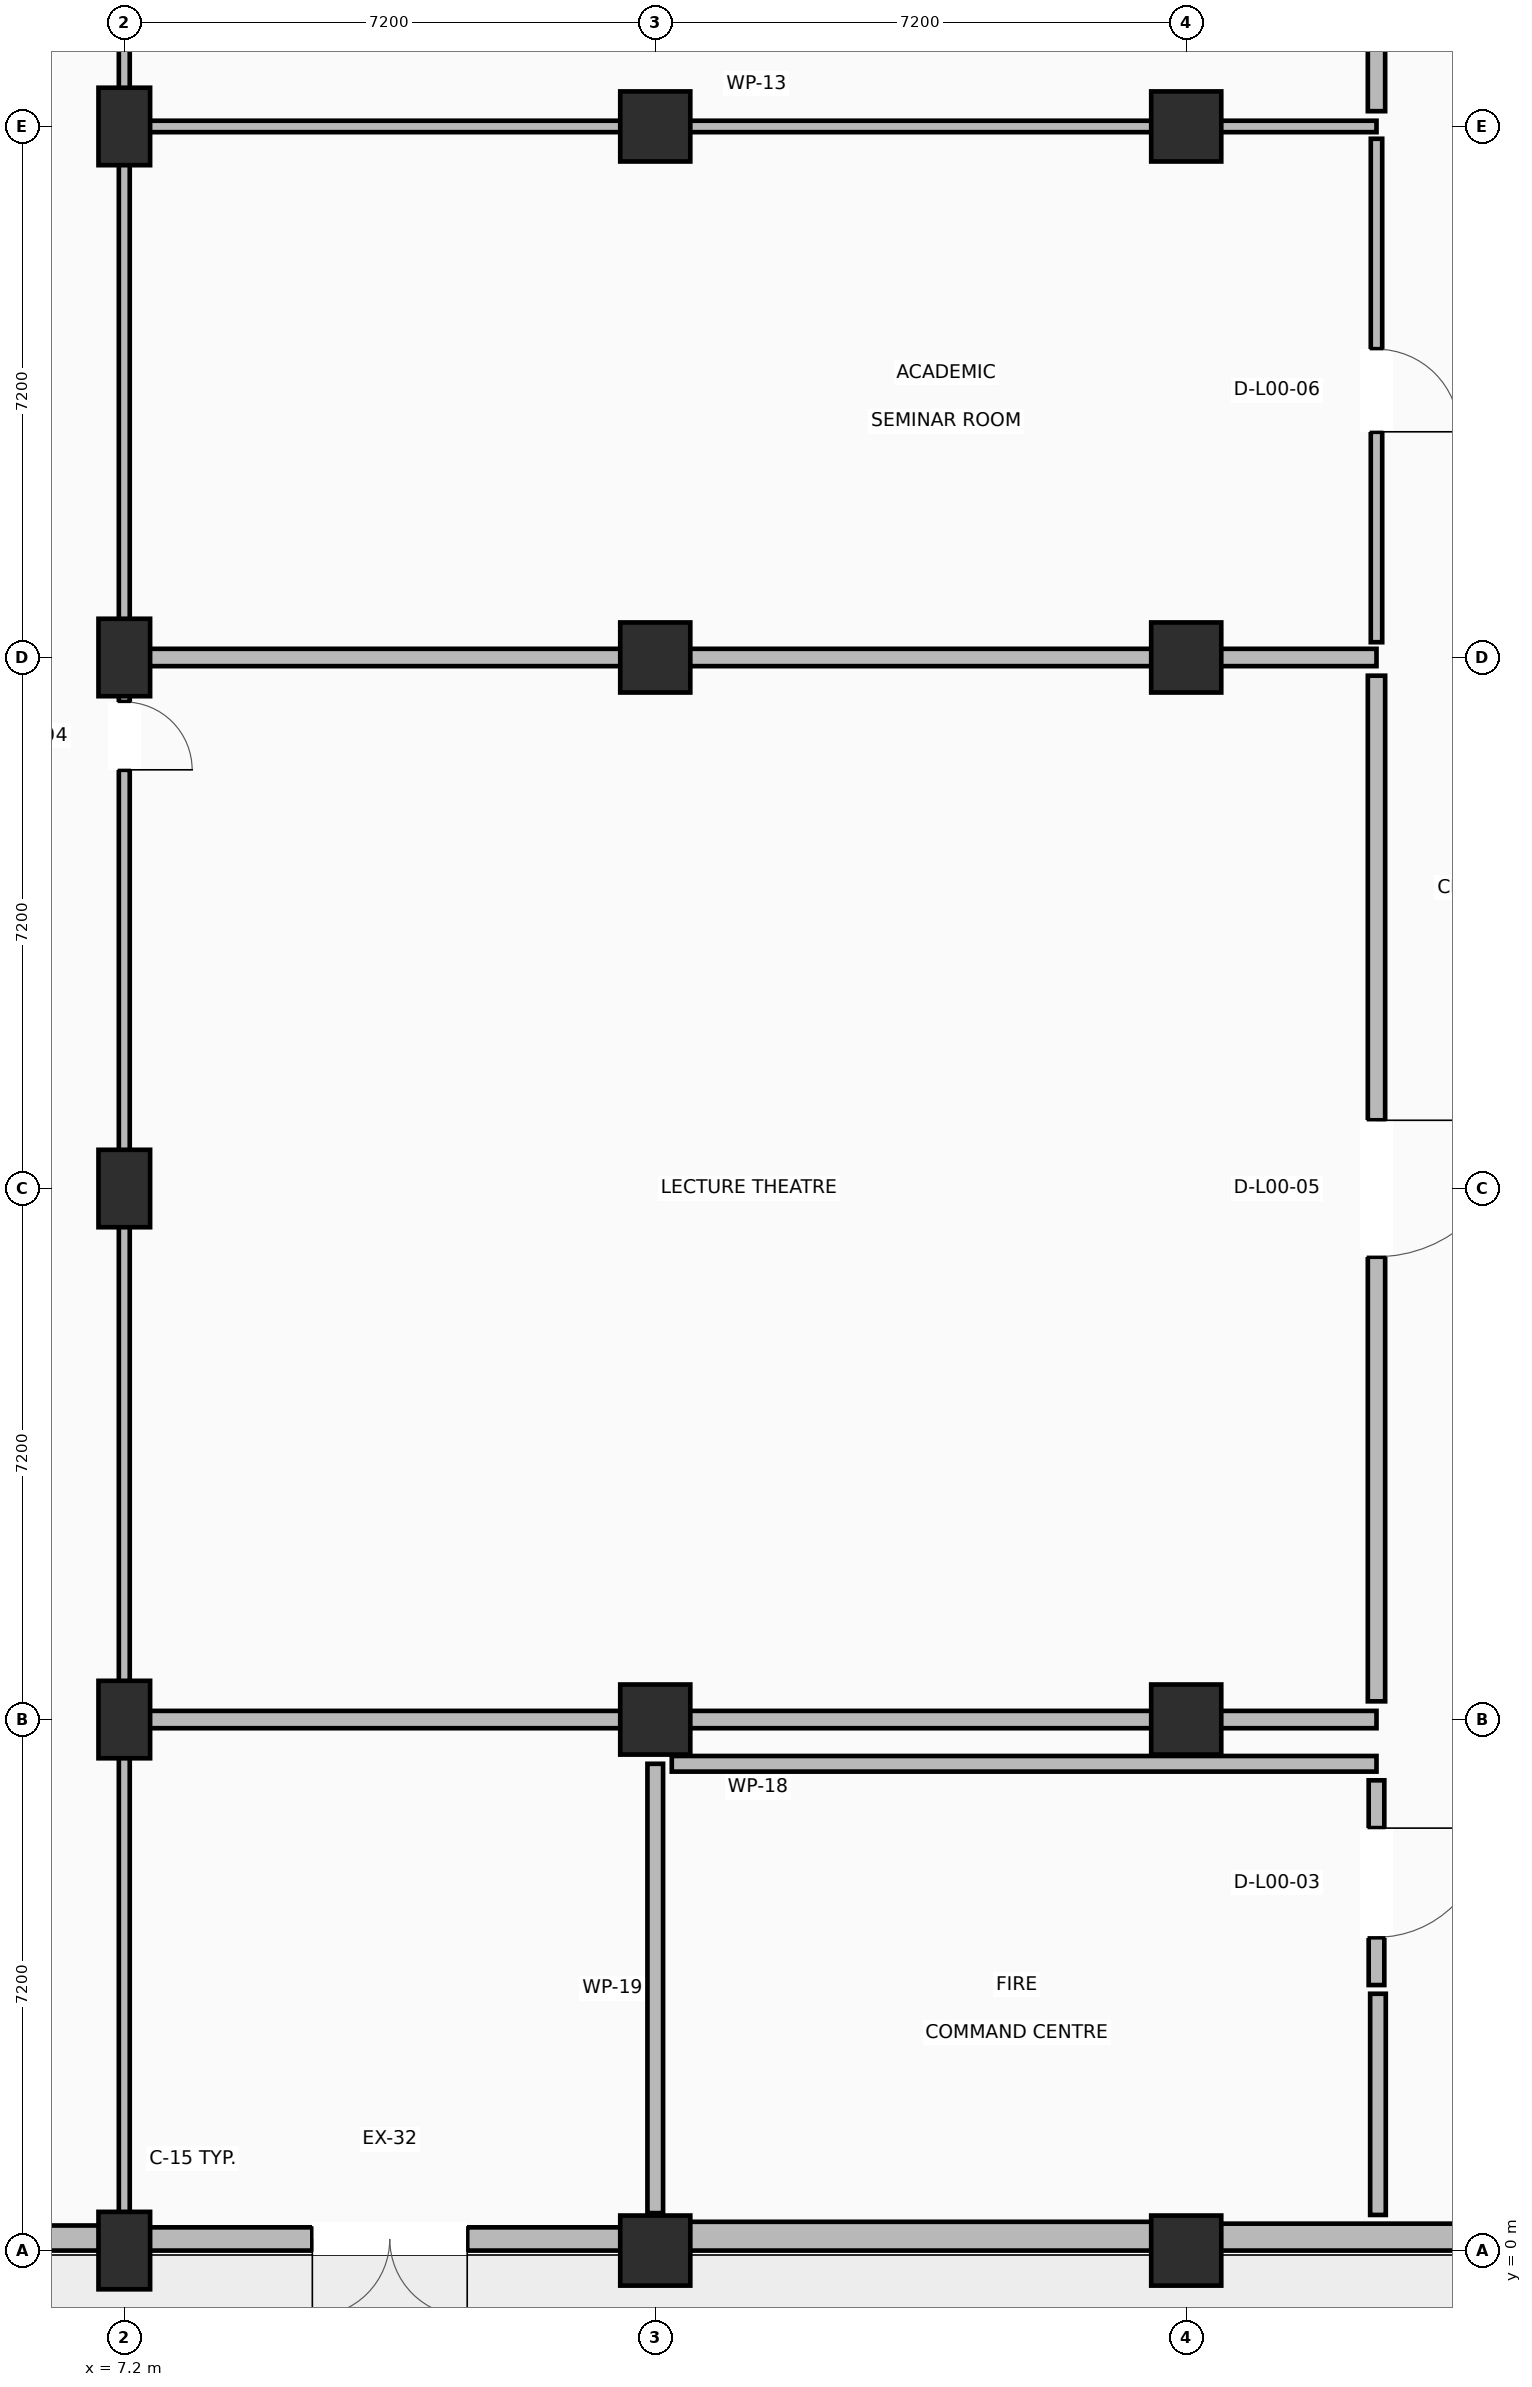
"""IFC4 building model, lengths in metres.
Left out: names, types, materials, properties, quantities, classifications, styles, units other than length and angle.
Written with IfcOpenShell. Run it as: python <this file> out.ifc"""

import sys

from ifc_helpers import new_model, si_unit, direction, frame, frame_2d, origin, origin_2d, place, context, subcontext, project, spatial, rectangle, extrude, element, fill, save


model = new_model("IFC4")
c1 = context("Model", 3, precision=1e-05, world=origin(), true_north=direction((0.0, 1.0)))
c2 = subcontext(c1, "Body", "Model", "MODEL_VIEW")
j1 = project(units=[si_unit("LENGTHUNIT", "METRE"), si_unit("PLANEANGLEUNIT", "RADIAN")], contexts=[c1])
p1 = place(None, origin())
s1 = spatial("IfcSite", under=j1, at=p1, CompositionType="ELEMENT")
p2 = place(p1, origin())
s2 = spatial("IfcBuilding", under=s1, at=p2, CompositionType="ELEMENT")
p3 = place(p2, origin())
s3 = spatial("IfcBuildingStorey", under=s2, at=p3, CompositionType="ELEMENT", Elevation=0.0)
for number, where, z_axis, x_axis in (
    (1, (7.2, 0.0, 0.0), (0.0, 0.0, 1.0), (1.0, 0.0, 0.0)),
    (2, (7.2, 7.2, 0.0), (0.0, 0.0, 1.0), (1.0, 0.0, 0.0)),
    (3, (7.2, 14.4, 0.0), (0.0, 0.0, 1.0), (1.0, 0.0, 0.0)),
    (4, (7.2, 21.6, 0.0), (0.0, 0.0, 1.0), (1.0, 0.0, 0.0)),
    (5, (7.2, 28.8, 0.0), (0.0, 0.0, 1.0), (1.0, 0.0, 0.0)),
):
    element("IfcColumn", number, at=place(p3, frame(where, z_axis=z_axis, x_axis=x_axis)), inside=s3, PredefinedType="COLUMN", context=c2, shape_type="SweptSolid", body=[
        extrude(rectangle(XDim=0.7, YDim=1.05, at=origin_2d()), origin(), (0.0, 0.0, 1.0), 4.22),
    ])
for number, where, z_axis, x_axis in (
    (6, (14.4, 0.0, 0.0), (0.0, 0.0, 1.0), (1.0, 0.0, 0.0)),
    (7, (14.4, 7.2, 0.0), (0.0, 0.0, 1.0), (1.0, 0.0, 0.0)),
    (8, (14.4, 21.6, 0.0), (0.0, 0.0, 1.0), (1.0, 0.0, 0.0)),
    (9, (14.4, 28.8, 0.0), (0.0, 0.0, 1.0), (1.0, 0.0, 0.0)),
    (10, (21.6, 0.0, 0.0), (0.0, 0.0, 1.0), (1.0, 0.0, 0.0)),
    (11, (21.6, 7.2, 0.0), (0.0, 0.0, 1.0), (1.0, 0.0, 0.0)),
    (12, (21.6, 21.6, 0.0), (0.0, 0.0, 1.0), (1.0, 0.0, 0.0)),
    (13, (21.6, 28.8, 0.0), (0.0, 0.0, 1.0), (1.0, 0.0, 0.0)),
):
    element("IfcColumn", number, at=place(p3, frame(where, z_axis=z_axis, x_axis=x_axis)), inside=s3, PredefinedType="COLUMN", context=c2, shape_type="SweptSolid", body=[
        extrude(rectangle(XDim=0.95, YDim=0.95, at=origin_2d()), origin(), (0.0, 0.0, 1.0), 4.22),
    ])
p4 = place(p3, frame((7.2, 0.17, 0.0), z_axis=(0.0, 0.0, 1.0), x_axis=(-1.0, 0.0, 0.0)))
e14 = element("IfcWall", 14, at=p4, inside=s3, PredefinedType="STANDARD", context=c2, shape_type="SweptSolid", body=[
    extrude(rectangle(XDim=7.2, YDim=0.34, at=frame_2d((3.6, 0.0))), origin(), (0.0, 0.0, 1.0), 2.6),
])
p5 = place(p3, frame((14.4, 0.157, 0.0), z_axis=(0.0, 0.0, 1.0), x_axis=(-1.0, 0.0, 0.0)))
e15 = element("IfcWall", 15, at=p5, inside=s3, PredefinedType="STANDARD", context=c2, shape_type="SweptSolid", body=[
    extrude(rectangle(XDim=7.2, YDim=0.315, at=frame_2d((3.6, 0.0))), origin(), (0.0, 0.0, 1.0), 2.6),
])
p6 = place(p5, frame((2.55, 0.0, 0.0)))
e16 = element("IfcOpeningElement", 16, at=p6, cuts=e15, PredefinedType="OPENING", context=c2, shape_type="SweptSolid", body=[
    extrude(rectangle(XDim=2.1, YDim=2.3, at=frame_2d((1.05, 1.15))), frame((0.0, 0.167, 0.0), z_axis=(0.0, -1.0, 0.0), x_axis=(1.0, 0.0, 0.0)), (0.0, 0.0, 1.0), 0.335),
])
p7 = place(p3, frame((21.6, 0.195, 0.0), z_axis=(0.0, 0.0, 1.0), x_axis=(-1.0, 0.0, 0.0)))
e17 = element("IfcWall", 17, at=p7, inside=s3, PredefinedType="STANDARD", context=c2, shape_type="SweptSolid", body=[
    extrude(rectangle(XDim=7.2, YDim=0.39, at=frame_2d((3.6, 0.0))), origin(), (0.0, 0.0, 1.0), 2.6),
])
p8 = place(p3, frame((28.8, 0.183, 0.0), z_axis=(0.0, 0.0, 1.0), x_axis=(-1.0, 0.0, 0.0)))
e18 = element("IfcWall", 18, at=p8, inside=s3, PredefinedType="STANDARD", context=c2, shape_type="SweptSolid", body=[
    extrude(rectangle(XDim=7.2, YDim=0.365, at=frame_2d((3.6, 0.0))), origin(), (0.0, 0.0, 1.0), 2.6),
])
p9 = place(p8, frame((1.2, 0.0, 0.0)))
e19 = element("IfcOpeningElement", 19, at=p9, cuts=e18, PredefinedType="OPENING", context=c2, shape_type="SweptSolid", body=[
    extrude(rectangle(XDim=2.1, YDim=2.3, at=frame_2d((1.05, 1.15))), frame((0.0, 0.192, 0.0), z_axis=(0.0, -1.0, 0.0), x_axis=(1.0, 0.0, 0.0)), (0.0, 0.0, 1.0), 0.385),
])
p10 = place(p3, frame((14.4, 0.508, 0.0), z_axis=(0.0, 0.0, 1.0), x_axis=(0.0, 1.0, 0.0)))
e20 = element("IfcWall", 20, at=p10, inside=s3, PredefinedType="PARTITIONING", context=c2, shape_type="SweptSolid", body=[
    extrude(rectangle(XDim=6.092, YDim=0.212, at=frame_2d((3.046, 0.0))), origin(), (0.0, 0.0, 1.0), 2.6),
])
p11 = place(p3, frame((14.624, 6.6, 0.0), z_axis=(0.0, 0.0, 1.0), x_axis=(1.0, 0.0, 0.0)))
e21 = element("IfcWall", 21, at=p11, inside=s3, PredefinedType="PARTITIONING", context=c2, shape_type="SweptSolid", body=[
    extrude(rectangle(XDim=9.556, YDim=0.212, at=frame_2d((4.778, 0.0))), origin(), (0.0, 0.0, 1.0), 2.6),
])
p12 = place(p3, frame((24.18, 6.376, 0.0), z_axis=(0.0, 0.0, 1.0), x_axis=(0.0, -1.0, 0.0)))
e22 = element("IfcWall", 22, at=p12, inside=s3, PredefinedType="PARTITIONING", context=c2, shape_type="SweptSolid", body=[
    extrude(rectangle(XDim=2.776, YDim=0.212, at=frame_2d((1.388, 0.0))), origin(), (0.0, 0.0, 1.0), 2.6),
])
p13 = place(p12, frame((0.648, 0.0, 0.0)))
e23 = element("IfcOpeningElement", 23, at=p13, cuts=e22, PredefinedType="OPENING", context=c2, shape_type="SweptSolid", body=[
    extrude(rectangle(XDim=1.48, YDim=2.2, at=frame_2d((0.74, 1.1))), frame((0.0, 0.116, 0.0), z_axis=(0.0, -1.0, 0.0), x_axis=(1.0, 0.0, 0.0)), (0.0, 0.0, 1.0), 0.232),
])
p14 = place(p3, frame((24.2, 3.482, 0.0), z_axis=(0.0, 0.0, 1.0), x_axis=(0.0, -1.0, 0.0)))
e24 = element("IfcWall", 24, at=p14, inside=s3, PredefinedType="PARTITIONING", context=c2, shape_type="SweptSolid", body=[
    extrude(rectangle(XDim=2.999, YDim=0.212, at=frame_2d((1.5, 0.0))), origin(), (0.0, 0.0, 1.0), 2.6),
])
p15 = place(p3, frame((7.2, 42.749, 0.0), z_axis=(0.0, 0.0, 1.0), x_axis=(0.0, -1.0, 0.0)))
e25 = element("IfcWall", 25, at=p15, inside=s3, PredefinedType="PARTITIONING", context=c2, shape_type="SweptSolid", body=[
    extrude(rectangle(XDim=42.323, YDim=0.148, at=frame_2d((21.162, 0.0))), origin(), (0.0, 0.0, 1.0), 2.6),
])
p16 = place(p15, frame((21.752, 0.0, 0.0)))
e26 = element("IfcOpeningElement", 26, at=p16, cuts=e25, PredefinedType="OPENING", context=c2, shape_type="SweptSolid", body=[
    extrude(rectangle(XDim=0.92, YDim=2.1, at=frame_2d((0.46, 1.05))), frame((0.0, 0.084, 0.0), z_axis=(0.0, -1.0, 0.0), x_axis=(1.0, 0.0, 0.0)), (0.0, 0.0, 1.0), 0.168),
])
for number, where, z_axis, x_axis in (
    (27, (24.18, 7.2, 0.0), (0.0, 0.0, 1.0), (-1.0, 0.0, 0.0)),
    (28, (7.404, 21.6, 0.0), (0.0, 0.0, 1.0), (1.0, 0.0, 0.0)),
):
    element("IfcWall", number, at=place(p3, frame(where, z_axis=z_axis, x_axis=x_axis)), inside=s3, PredefinedType="PARTITIONING", context=c2, shape_type="SweptSolid", body=[
        extrude(rectangle(XDim=16.776, YDim=0.235, at=frame_2d((8.388, 0.0))), origin(), (0.0, 0.0, 1.0), 2.6),
    ])
p17 = place(p3, frame((24.18, 21.353, 0.0), z_axis=(0.0, 0.0, 1.0), x_axis=(0.0, -1.0, 0.0)))
e29 = element("IfcWall", 29, at=p17, inside=s3, PredefinedType="PARTITIONING", context=c2, shape_type="SweptSolid", body=[
    extrude(rectangle(XDim=13.906, YDim=0.235, at=frame_2d((6.953, 0.0))), origin(), (0.0, 0.0, 1.0), 2.6),
])
p18 = place(p17, frame((6.028, 0.0, 0.0)))
e30 = element("IfcOpeningElement", 30, at=p18, cuts=e29, PredefinedType="OPENING", context=c2, shape_type="SweptSolid", body=[
    extrude(rectangle(XDim=1.85, YDim=2.25, at=frame_2d((0.925, 1.125))), frame((0.0, 0.127, 0.0), z_axis=(0.0, -1.0, 0.0), x_axis=(1.0, 0.0, 0.0)), (0.0, 0.0, 1.0), 0.255),
])
p19 = place(p3, frame((7.364, 28.8, 0.0), z_axis=(0.0, 0.0, 1.0), x_axis=(1.0, 0.0, 0.0)))
e31 = element("IfcWall", 31, at=p19, inside=s3, PredefinedType="PARTITIONING", context=c2, shape_type="SweptSolid", body=[
    extrude(rectangle(XDim=16.816, YDim=0.155, at=frame_2d((8.408, 0.0))), origin(), (0.0, 0.0, 1.0), 2.6),
])
p20 = place(p3, frame((24.18, 28.633, 0.0), z_axis=(0.0, 0.0, 1.0), x_axis=(0.0, -1.0, 0.0)))
e32 = element("IfcWall", 32, at=p20, inside=s3, PredefinedType="PARTITIONING", context=c2, shape_type="SweptSolid", body=[
    extrude(rectangle(XDim=6.826, YDim=0.155, at=frame_2d((3.413, 0.0))), origin(), (0.0, 0.0, 1.0), 2.6),
])
p21 = place(p20, frame((2.853, 0.0, 0.0)))
e33 = element("IfcOpeningElement", 33, at=p21, cuts=e32, PredefinedType="OPENING", context=c2, shape_type="SweptSolid", body=[
    extrude(rectangle(XDim=1.12, YDim=2.15, at=frame_2d((0.56, 1.075))), frame((0.0, 0.087, 0.0), z_axis=(0.0, -1.0, 0.0), x_axis=(1.0, 0.0, 0.0)), (0.0, 0.0, 1.0), 0.175),
])
p22 = place(p3, frame((24.18, 39.0, 0.0), z_axis=(0.0, 0.0, 1.0), x_axis=(0.0, -1.0, 0.0)))
e34 = element("IfcWall", 34, at=p22, inside=s3, PredefinedType="PARTITIONING", context=c2, shape_type="SweptSolid", body=[
    extrude(rectangle(XDim=9.993, YDim=0.235, at=frame_2d((4.997, 0.0))), origin(), (0.0, 0.0, 1.0), 2.6),
])
p23 = place(p22, frame((4.071, 0.0, 0.0)))
e35 = element("IfcOpeningElement", 35, at=p23, cuts=e34, PredefinedType="OPENING", context=c2, shape_type="SweptSolid", body=[
    extrude(rectangle(XDim=1.85, YDim=2.25, at=frame_2d((0.925, 1.125))), frame((0.0, 0.127, 0.0), z_axis=(0.0, -1.0, 0.0), x_axis=(1.0, 0.0, 0.0)), (0.0, 0.0, 1.0), 0.255),
])
p24 = place(p6, origin())
e36 = element("IfcDoor", 36, at=p24, inside=s3, OperationType="DOUBLE_DOOR_SINGLE_SWING", PredefinedType="DOOR", context=c2, shape_type="SweptSolid", body=[
    extrude(rectangle(XDim=2.1, YDim=2.3, at=frame_2d((1.05, 1.15))), frame((0.0, 0.025, 0.0), z_axis=(0.0, -1.0, 0.0), x_axis=(1.0, 0.0, 0.0)), (0.0, 0.0, 1.0), 0.05),
])
fill(e16, e36)
p25 = place(p13, origin())
e37 = element("IfcDoor", 37, at=p25, inside=s3, OperationType="SINGLE_SWING_LEFT", PredefinedType="DOOR", context=c2, shape_type="SweptSolid", body=[
    extrude(rectangle(XDim=1.48, YDim=2.2, at=frame_2d((0.74, 1.1))), frame((0.0, 0.025, 0.0), z_axis=(0.0, -1.0, 0.0), x_axis=(1.0, 0.0, 0.0)), (0.0, 0.0, 1.0), 0.05),
])
fill(e23, e37)
p26 = place(p16, origin())
e38 = element("IfcDoor", 38, at=p26, inside=s3, OperationType="SINGLE_SWING_RIGHT", PredefinedType="DOOR", context=c2, shape_type="SweptSolid", body=[
    extrude(rectangle(XDim=0.92, YDim=2.1, at=frame_2d((0.46, 1.05))), frame((0.0, 0.025, 0.0), z_axis=(0.0, -1.0, 0.0), x_axis=(1.0, 0.0, 0.0)), (0.0, 0.0, 1.0), 0.05),
])
fill(e26, e38)
p27 = place(p18, origin())
e39 = element("IfcDoor", 39, at=p27, inside=s3, OperationType="SINGLE_SWING_LEFT", PredefinedType="DOOR", context=c2, shape_type="SweptSolid", body=[
    extrude(rectangle(XDim=1.85, YDim=2.25, at=frame_2d((0.925, 1.125))), frame((0.0, 0.025, 0.0), z_axis=(0.0, -1.0, 0.0), x_axis=(1.0, 0.0, 0.0)), (0.0, 0.0, 1.0), 0.05),
])
fill(e30, e39)
p28 = place(p21, origin())
e40 = element("IfcDoor", 40, at=p28, inside=s3, OperationType="SINGLE_SWING_RIGHT", PredefinedType="DOOR", context=c2, shape_type="SweptSolid", body=[
    extrude(rectangle(XDim=1.12, YDim=2.15, at=frame_2d((0.56, 1.075))), frame((0.0, 0.025, 0.0), z_axis=(0.0, -1.0, 0.0), x_axis=(1.0, 0.0, 0.0)), (0.0, 0.0, 1.0), 0.05),
])
fill(e33, e40)
save(model, sys.argv[1])
